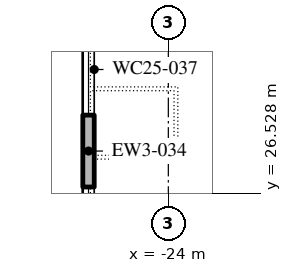
"""IFC4 building model, lengths in metres.
Left out: names, types, materials, properties, quantities, classifications, styles, units other than length and angle.
Written with IfcOpenShell. Run it as: python <this file> out.ifc"""

import sys

from ifc_helpers import new_model, si_unit, direction, frame, frame_2d, origin, place, context, subcontext, project, spatial, polyline, rectangle, outline, extrude, element, fill, save


model = new_model("IFC4")
c1 = context("Model", 3, precision=1e-05, world=origin(), true_north=direction((0.0, 1.0)))
c2 = subcontext(c1, "Body", "Model", "MODEL_VIEW")
j1 = project(units=[si_unit("LENGTHUNIT", "METRE"), si_unit("PLANEANGLEUNIT", "RADIAN")], contexts=[c1])
p1 = place(None, origin())
s1 = spatial("IfcSite", under=j1, at=p1, CompositionType="ELEMENT")
p2 = place(p1, origin())
s2 = spatial("IfcBuilding", under=s1, at=p2, CompositionType="ELEMENT")
p3 = place(p2, frame((0.0, 0.0, 369.0)))
s3 = spatial("IfcBuildingStorey", under=s2, at=p3, CompositionType="ELEMENT", Elevation=369.0)
p4 = place(p3, frame((-26.1, 31.933, 0.0), z_axis=(0.0, 0.0, 1.0), x_axis=(0.0, -1.0, 0.0)))
e1 = element("IfcWall", 1, at=p4, inside=s3, PredefinedType="STANDARD", context=c2, shape_type="SweptSolid", body=[
    extrude(rectangle(XDim=8.583, YDim=0.3, at=frame_2d((4.292, 0.0))), origin(), (0.0, 0.0, 1.0), 4.0),
])
p5 = place(p4, frame((0.946, 0.0, 0.8)))
e2 = element("IfcOpeningElement", 2, at=p5, cuts=e1, PredefinedType="OPENING", context=c2, shape_type="SweptSolid", body=[
    extrude(outline(polyline([(0.0, 0.0), (2.4, 0.0), (2.4, 1.25), (2.377, 1.488), (2.31, 1.717), (2.2, 1.929), (2.051, 2.116), (1.87, 2.272), (1.663, 2.391), (1.437, 2.468), (1.2, 2.5), (0.963, 2.468), (0.737, 2.391), (0.53, 2.272), (0.349, 2.116), (0.2, 1.929), (0.09, 1.717), (0.023, 1.488), (0.0, 1.25), (0.0, 0.0)])), frame((0.0, 0.16, 0.0), z_axis=(0.0, -1.0, 0.0), x_axis=(1.0, 0.0, 0.0)), (0.0, 0.0, 1.0), 0.32),
])
p6 = place(p4, frame((5.238, 0.0, 0.8)))
e3 = element("IfcOpeningElement", 3, at=p6, cuts=e1, PredefinedType="OPENING", context=c2, shape_type="SweptSolid", body=[
    extrude(outline(polyline([(0.0, 0.0), (2.4, 0.0), (2.4, 1.25), (2.377, 1.488), (2.31, 1.717), (2.2, 1.929), (2.051, 2.116), (1.87, 2.272), (1.663, 2.391), (1.437, 2.468), (1.2, 2.5), (0.963, 2.468), (0.737, 2.391), (0.53, 2.272), (0.349, 2.116), (0.2, 1.929), (0.09, 1.717), (0.023, 1.488), (0.0, 1.25), (0.0, 0.0)])), frame((0.0, 0.16, 0.0), z_axis=(0.0, -1.0, 0.0), x_axis=(1.0, 0.0, 0.0)), (0.0, 0.0, 1.0), 0.32),
])
p7 = place(p5, origin())
e4 = element("IfcWindow", 4, at=p7, inside=s3, PartitioningType="DOUBLE_PANEL_VERTICAL", PredefinedType="WINDOW", context=c2, shape_type="SweptSolid", body=[
    extrude(outline(polyline([(0.0, 0.0), (2.4, 0.0), (2.4, 1.25), (2.377, 1.488), (2.31, 1.717), (2.2, 1.929), (2.051, 2.116), (1.87, 2.272), (1.663, 2.391), (1.437, 2.468), (1.2, 2.5), (0.963, 2.468), (0.737, 2.391), (0.53, 2.272), (0.349, 2.116), (0.2, 1.929), (0.09, 1.717), (0.023, 1.488), (0.0, 1.25), (0.0, 0.0)])), frame((0.0, 0.03, 0.0), z_axis=(0.0, -1.0, 0.0), x_axis=(1.0, 0.0, 0.0)), (0.0, 0.0, 1.0), 0.06),
])
fill(e2, e4)
p8 = place(p6, origin())
e5 = element("IfcWindow", 5, at=p8, inside=s3, PartitioningType="DOUBLE_PANEL_VERTICAL", PredefinedType="WINDOW", context=c2, shape_type="SweptSolid", body=[
    extrude(outline(polyline([(0.0, 0.0), (2.4, 0.0), (2.4, 1.25), (2.377, 1.488), (2.31, 1.717), (2.2, 1.929), (2.051, 2.116), (1.87, 2.272), (1.663, 2.391), (1.437, 2.468), (1.2, 2.5), (0.963, 2.468), (0.737, 2.391), (0.53, 2.272), (0.349, 2.116), (0.2, 1.929), (0.09, 1.717), (0.023, 1.488), (0.0, 1.25), (0.0, 0.0)])), frame((0.0, 0.03, 0.0), z_axis=(0.0, -1.0, 0.0), x_axis=(1.0, 0.0, 0.0)), (0.0, 0.0, 1.0), 0.06),
])
fill(e3, e5)
save(model, sys.argv[1])
